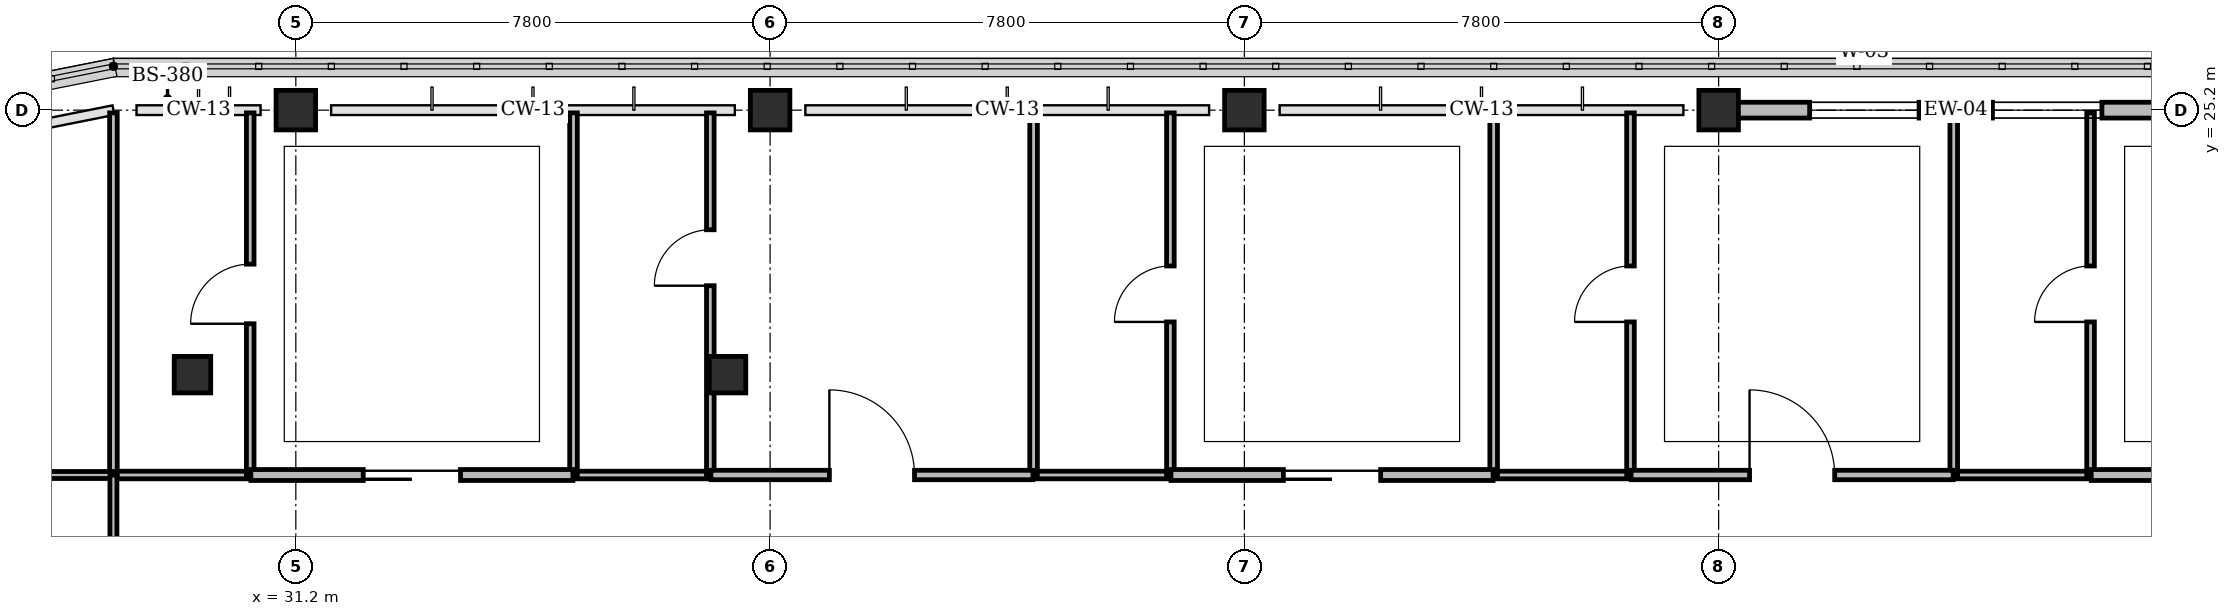
"""IFC4 building model, lengths in metres.
Left out: names, types, materials, properties, quantities, classifications, styles, units other than length and angle.
Written with IfcOpenShell. Run it as: python <this file> out.ifc"""

import sys

from ifc_helpers import new_model, si_unit, direction, frame, frame_2d, origin, origin_2d, place, context, subcontext, project, spatial, rectangle, circle, extrude, element, fill, save


model = new_model("IFC4")
c1 = context("Model", 3, precision=1e-05, world=origin(), true_north=direction((0.0, 1.0)))
c2 = subcontext(c1, "Body", "Model", "MODEL_VIEW")
j1 = project(units=[si_unit("LENGTHUNIT", "METRE"), si_unit("PLANEANGLEUNIT", "RADIAN")], contexts=[c1])
p1 = place(None, origin())
s1 = spatial("IfcSite", under=j1, at=p1, CompositionType="ELEMENT")
p2 = place(p1, origin())
s2 = spatial("IfcBuilding", under=s1, at=p2, CompositionType="ELEMENT")
p3 = place(p2, frame((0.0, 0.0, 18.0)))
s3 = spatial("IfcBuildingStorey", under=s2, at=p3, CompositionType="ELEMENT", Elevation=18.0)
for number, where, z_axis, x_axis in (
    (1, (31.2, 25.2, 0.0), (0.0, 0.0, 1.0), (1.0, 0.0, 0.0)),
    (2, (39.0, 25.2, 0.0), (0.0, 0.0, 1.0), (1.0, 0.0, 0.0)),
    (3, (46.8, 25.2, 0.0), (0.0, 0.0, 1.0), (1.0, 0.0, 0.0)),
    (4, (54.6, 25.2, 0.0), (0.0, 0.0, 1.0), (1.0, 0.0, 0.0)),
):
    element("IfcColumn", number, at=place(p3, frame(where, z_axis=z_axis, x_axis=x_axis)), inside=s3, PredefinedType="COLUMN", context=c2, shape_type="SweptSolid", body=[
        extrude(rectangle(XDim=0.65, YDim=0.65, at=origin_2d()), origin(), (0.0, 0.0, 1.0), 4.2),
    ])
for number, where, z_axis, x_axis in (
    (5, (29.5, 20.85, 0.0), (0.0, 0.0, 1.0), (1.0, 0.0, 0.0)),
    (6, (38.3, 20.85, 0.0), (0.0, 0.0, 1.0), (1.0, 0.0, 0.0)),
):
    element("IfcColumn", number, at=place(p3, frame(where, z_axis=z_axis, x_axis=x_axis)), inside=s3, PredefinedType="PILASTER", context=c2, shape_type="SweptSolid", body=[
        extrude(circle(Radius=0.3, at=origin_2d()), origin(), (0.0, 0.0, 1.0), 4.2),
    ])
p4 = place(p3, frame((54.89, 25.2, 0.0), z_axis=(0.0, 0.0, 1.0), x_axis=(1.0, 0.0, 0.0)))
e7 = element("IfcWall", 7, at=p4, inside=s3, PredefinedType="STANDARD", context=c2, shape_type="SweptSolid", body=[
    extrude(rectangle(XDim=7.22, YDim=0.26, at=frame_2d((3.61, 0.0))), origin(), (0.0, 0.0, 1.0), 3.255),
])
p5 = place(p4, frame((1.207, 0.0, 0.85)))
e8 = element("IfcOpeningElement", 8, at=p5, cuts=e7, PredefinedType="OPENING", context=c2, shape_type="SweptSolid", body=[
    extrude(rectangle(XDim=1.8, YDim=1.5, at=frame_2d((0.9, 0.75))), frame((0.0, 0.14, 0.0), z_axis=(0.0, -1.0, 0.0), x_axis=(1.0, 0.0, 0.0)), (0.0, 0.0, 1.0), 0.28),
])
p6 = place(p4, frame((4.213, 0.0, 0.85)))
e9 = element("IfcOpeningElement", 9, at=p6, cuts=e7, PredefinedType="OPENING", context=c2, shape_type="SweptSolid", body=[
    extrude(rectangle(XDim=1.8, YDim=1.5, at=frame_2d((0.9, 0.75))), frame((0.0, 0.14, 0.0), z_axis=(0.0, -1.0, 0.0), x_axis=(1.0, 0.0, 0.0)), (0.0, 0.0, 1.0), 0.28),
])
p7 = place(p3, frame((28.2, 19.2, 0.0), z_axis=(0.0, 0.0, 1.0), x_axis=(1.0, 0.0, 0.0)))
e10 = element("IfcWall", 10, at=p7, inside=s3, PredefinedType="PARTITIONING", context=c2, shape_type="SweptSolid", body=[
    extrude(rectangle(XDim=2.25, YDim=0.125, at=frame_2d((1.125, 0.0))), origin(), (0.0, 0.0, 1.0), 3.9),
])
p8 = place(p3, frame((28.2, 19.2, 0.0), z_axis=(0.0, 0.0, 1.0), x_axis=(0.0, 1.0, 0.0)))
e11 = element("IfcWall", 11, at=p8, inside=s3, PredefinedType="PARTITIONING", context=c2, shape_type="SweptSolid", body=[
    extrude(rectangle(XDim=5.955, YDim=0.125, at=frame_2d((2.978, 0.0))), origin(), (0.0, 0.0, 1.0), 3.9),
])
p9 = place(p3, frame((30.45, 19.2, 0.0), z_axis=(0.0, 0.0, 1.0), x_axis=(0.0, 1.0, 0.0)))
e12 = element("IfcWall", 12, at=p9, inside=s3, PredefinedType="PARTITIONING", context=c2, shape_type="SweptSolid", body=[
    extrude(rectangle(XDim=5.955, YDim=0.125, at=frame_2d((2.978, 0.0))), origin(), (0.0, 0.0, 1.0), 3.9),
])
p10 = place(p9, frame((2.488, 0.0, 0.0)))
e13 = element("IfcOpeningElement", 13, at=p10, cuts=e12, PredefinedType="OPENING", context=c2, shape_type="SweptSolid", body=[
    extrude(rectangle(XDim=0.98, YDim=2.1, at=frame_2d((0.49, 1.05))), frame((0.0, 0.073, 0.0), z_axis=(0.0, -1.0, 0.0), x_axis=(1.0, 0.0, 0.0)), (0.0, 0.0, 1.0), 0.145),
])
p11 = place(p3, frame((35.767, 19.2, 0.0), z_axis=(0.0, 0.0, 1.0), x_axis=(1.0, 0.0, 0.0)))
e14 = element("IfcWall", 14, at=p11, inside=s3, PredefinedType="PARTITIONING", context=c2, shape_type="SweptSolid", body=[
    extrude(rectangle(XDim=2.25, YDim=0.125, at=frame_2d((1.125, 0.0))), origin(), (0.0, 0.0, 1.0), 3.9),
])
p12 = place(p3, frame((35.767, 19.2, 0.0), z_axis=(0.0, 0.0, 1.0), x_axis=(0.0, 1.0, 0.0)))
e15 = element("IfcWall", 15, at=p12, inside=s3, PredefinedType="PARTITIONING", context=c2, shape_type="SweptSolid", body=[
    extrude(rectangle(XDim=5.955, YDim=0.125, at=frame_2d((2.978, 0.0))), origin(), (0.0, 0.0, 1.0), 3.9),
])
p13 = place(p3, frame((38.017, 19.2, 0.0), z_axis=(0.0, 0.0, 1.0), x_axis=(0.0, 1.0, 0.0)))
e16 = element("IfcWall", 16, at=p13, inside=s3, PredefinedType="PARTITIONING", context=c2, shape_type="SweptSolid", body=[
    extrude(rectangle(XDim=5.955, YDim=0.125, at=frame_2d((2.978, 0.0))), origin(), (0.0, 0.0, 1.0), 3.9),
])
p14 = place(p13, frame((3.113, 0.0, 0.0)))
e17 = element("IfcOpeningElement", 17, at=p14, cuts=e16, PredefinedType="OPENING", context=c2, shape_type="SweptSolid", body=[
    extrude(rectangle(XDim=0.92, YDim=2.1, at=frame_2d((0.46, 1.05))), frame((0.0, 0.073, 0.0), z_axis=(0.0, -1.0, 0.0), x_axis=(1.0, 0.0, 0.0)), (0.0, 0.0, 1.0), 0.145),
])
p15 = place(p3, frame((43.333, 19.2, 0.0), z_axis=(0.0, 0.0, 1.0), x_axis=(1.0, 0.0, 0.0)))
e18 = element("IfcWall", 18, at=p15, inside=s3, PredefinedType="PARTITIONING", context=c2, shape_type="SweptSolid", body=[
    extrude(rectangle(XDim=2.25, YDim=0.125, at=frame_2d((1.125, 0.0))), origin(), (0.0, 0.0, 1.0), 3.9),
])
p16 = place(p3, frame((43.333, 19.2, 0.0), z_axis=(0.0, 0.0, 1.0), x_axis=(0.0, 1.0, 0.0)))
e19 = element("IfcWall", 19, at=p16, inside=s3, PredefinedType="PARTITIONING", context=c2, shape_type="SweptSolid", body=[
    extrude(rectangle(XDim=5.955, YDim=0.125, at=frame_2d((2.978, 0.0))), origin(), (0.0, 0.0, 1.0), 3.9),
])
p17 = place(p3, frame((45.583, 19.2, 0.0), z_axis=(0.0, 0.0, 1.0), x_axis=(0.0, 1.0, 0.0)))
e20 = element("IfcWall", 20, at=p17, inside=s3, PredefinedType="PARTITIONING", context=c2, shape_type="SweptSolid", body=[
    extrude(rectangle(XDim=5.955, YDim=0.125, at=frame_2d((2.978, 0.0))), origin(), (0.0, 0.0, 1.0), 3.9),
])
p18 = place(p17, frame((2.518, 0.0, 0.0)))
e21 = element("IfcOpeningElement", 21, at=p18, cuts=e20, PredefinedType="OPENING", context=c2, shape_type="SweptSolid", body=[
    extrude(rectangle(XDim=0.92, YDim=2.1, at=frame_2d((0.46, 1.05))), frame((0.0, 0.073, 0.0), z_axis=(0.0, -1.0, 0.0), x_axis=(1.0, 0.0, 0.0)), (0.0, 0.0, 1.0), 0.145),
])
p19 = place(p3, frame((50.9, 19.2, 0.0), z_axis=(0.0, 0.0, 1.0), x_axis=(1.0, 0.0, 0.0)))
e22 = element("IfcWall", 22, at=p19, inside=s3, PredefinedType="PARTITIONING", context=c2, shape_type="SweptSolid", body=[
    extrude(rectangle(XDim=2.25, YDim=0.125, at=frame_2d((1.125, 0.0))), origin(), (0.0, 0.0, 1.0), 3.9),
])
p20 = place(p3, frame((50.9, 19.2, 0.0), z_axis=(0.0, 0.0, 1.0), x_axis=(0.0, 1.0, 0.0)))
e23 = element("IfcWall", 23, at=p20, inside=s3, PredefinedType="PARTITIONING", context=c2, shape_type="SweptSolid", body=[
    extrude(rectangle(XDim=5.955, YDim=0.125, at=frame_2d((2.978, 0.0))), origin(), (0.0, 0.0, 1.0), 3.9),
])
p21 = place(p3, frame((53.15, 19.2, 0.0), z_axis=(0.0, 0.0, 1.0), x_axis=(0.0, 1.0, 0.0)))
e24 = element("IfcWall", 24, at=p21, inside=s3, PredefinedType="PARTITIONING", context=c2, shape_type="SweptSolid", body=[
    extrude(rectangle(XDim=5.955, YDim=0.125, at=frame_2d((2.978, 0.0))), origin(), (0.0, 0.0, 1.0), 3.9),
])
p22 = place(p21, frame((2.518, 0.0, 0.0)))
e25 = element("IfcOpeningElement", 25, at=p22, cuts=e24, PredefinedType="OPENING", context=c2, shape_type="SweptSolid", body=[
    extrude(rectangle(XDim=0.92, YDim=2.1, at=frame_2d((0.46, 1.05))), frame((0.0, 0.073, 0.0), z_axis=(0.0, -1.0, 0.0), x_axis=(1.0, 0.0, 0.0)), (0.0, 0.0, 1.0), 0.145),
])
p23 = place(p3, frame((58.467, 19.2, 0.0), z_axis=(0.0, 0.0, 1.0), x_axis=(1.0, 0.0, 0.0)))
e26 = element("IfcWall", 26, at=p23, inside=s3, PredefinedType="PARTITIONING", context=c2, shape_type="SweptSolid", body=[
    extrude(rectangle(XDim=2.25, YDim=0.125, at=frame_2d((1.125, 0.0))), origin(), (0.0, 0.0, 1.0), 3.9),
])
p24 = place(p3, frame((58.467, 19.2, 0.0), z_axis=(0.0, 0.0, 1.0), x_axis=(0.0, 1.0, 0.0)))
e27 = element("IfcWall", 27, at=p24, inside=s3, PredefinedType="PARTITIONING", context=c2, shape_type="SweptSolid", body=[
    extrude(rectangle(XDim=5.955, YDim=0.125, at=frame_2d((2.978, 0.0))), origin(), (0.0, 0.0, 1.0), 3.9),
])
p25 = place(p3, frame((60.717, 19.2, 0.0), z_axis=(0.0, 0.0, 1.0), x_axis=(0.0, 1.0, 0.0)))
e28 = element("IfcWall", 28, at=p25, inside=s3, PredefinedType="PARTITIONING", context=c2, shape_type="SweptSolid", body=[
    extrude(rectangle(XDim=5.955, YDim=0.125, at=frame_2d((2.978, 0.0))), origin(), (0.0, 0.0, 1.0), 3.9),
])
p26 = place(p25, frame((2.518, 0.0, 0.0)))
e29 = element("IfcOpeningElement", 29, at=p26, cuts=e28, PredefinedType="OPENING", context=c2, shape_type="SweptSolid", body=[
    extrude(rectangle(XDim=0.92, YDim=2.1, at=frame_2d((0.46, 1.05))), frame((0.0, 0.073, 0.0), z_axis=(0.0, -1.0, 0.0), x_axis=(1.0, 0.0, 0.0)), (0.0, 0.0, 1.0), 0.145),
])
p27 = place(p3, frame((16.1, 19.2, 0.0), z_axis=(0.0, 0.0, 1.0), x_axis=(1.0, 0.0, 0.0)))
e30 = element("IfcWall", 30, at=p27, inside=s3, PredefinedType="PARTITIONING", context=c2, shape_type="SweptSolid", body=[
    extrude(rectangle(XDim=12.1, YDim=0.115, at=frame_2d((6.05, 0.0))), origin(), (0.0, 0.0, 1.0), 3.9),
])
p28 = place(p3, frame((28.2, 6.0, 0.0), z_axis=(0.0, 0.0, 1.0), x_axis=(0.0, 1.0, 0.0)))
e31 = element("IfcWall", 31, at=p28, inside=s3, PredefinedType="PARTITIONING", context=c2, shape_type="SweptSolid", body=[
    extrude(rectangle(XDim=13.2, YDim=0.115, at=frame_2d((6.6, 0.0))), origin(), (0.0, 0.0, 1.0), 3.9),
])
p29 = place(p28, frame((0.85, 0.0, 0.0)))
e32 = element("IfcOpeningElement", 32, at=p29, cuts=e31, PredefinedType="OPENING", context=c2, shape_type="SweptSolid", body=[
    extrude(rectangle(XDim=1.32, YDim=2.15, at=frame_2d((0.66, 1.075))), frame((0.0, 0.067, 0.0), z_axis=(0.0, -1.0, 0.0), x_axis=(1.0, 0.0, 0.0)), (0.0, 0.0, 1.0), 0.135),
])
p30 = place(p3, frame((30.46, 19.2, 0.0), z_axis=(0.0, 0.0, 1.0), x_axis=(1.0, 0.0, 0.0)))
e33 = element("IfcWall", 33, at=p30, inside=s3, PredefinedType="PARTITIONING", context=c2, shape_type="SweptSolid", body=[
    extrude(rectangle(XDim=5.297, YDim=0.18, at=frame_2d((2.648, 0.0))), origin(), (0.0, 0.0, 1.0), 3.9),
])
p31 = place(p30, frame((1.848, 0.0, 0.0)))
e34 = element("IfcOpeningElement", 34, at=p31, cuts=e33, PredefinedType="OPENING", context=c2, shape_type="SweptSolid", body=[
    extrude(rectangle(XDim=1.6, YDim=2.25, at=frame_2d((0.8, 1.125))), frame((0.0, 0.1, 0.0), z_axis=(0.0, -1.0, 0.0), x_axis=(1.0, 0.0, 0.0)), (0.0, 0.0, 1.0), 0.2),
])
p32 = place(p3, frame((38.027, 19.2, 0.0), z_axis=(0.0, 0.0, 1.0), x_axis=(1.0, 0.0, 0.0)))
e35 = element("IfcWall", 35, at=p32, inside=s3, PredefinedType="PARTITIONING", context=c2, shape_type="SweptSolid", body=[
    extrude(rectangle(XDim=5.296, YDim=0.155, at=frame_2d((2.648, 0.0))), origin(), (0.0, 0.0, 1.0), 3.9),
])
p33 = place(p32, frame((1.948, 0.0, 0.0)))
e36 = element("IfcOpeningElement", 36, at=p33, cuts=e35, PredefinedType="OPENING", context=c2, shape_type="SweptSolid", body=[
    extrude(rectangle(XDim=1.4, YDim=2.2, at=frame_2d((0.7, 1.1))), frame((0.0, 0.087, 0.0), z_axis=(0.0, -1.0, 0.0), x_axis=(1.0, 0.0, 0.0)), (0.0, 0.0, 1.0), 0.175),
])
p34 = place(p3, frame((45.593, 19.2, 0.0), z_axis=(0.0, 0.0, 1.0), x_axis=(1.0, 0.0, 0.0)))
e37 = element("IfcWall", 37, at=p34, inside=s3, PredefinedType="PARTITIONING", context=c2, shape_type="SweptSolid", body=[
    extrude(rectangle(XDim=5.297, YDim=0.18, at=frame_2d((2.648, 0.0))), origin(), (0.0, 0.0, 1.0), 3.9),
])
p35 = place(p34, frame((1.848, 0.0, 0.0)))
e38 = element("IfcOpeningElement", 38, at=p35, cuts=e37, PredefinedType="OPENING", context=c2, shape_type="SweptSolid", body=[
    extrude(rectangle(XDim=1.6, YDim=2.25, at=frame_2d((0.8, 1.125))), frame((0.0, 0.1, 0.0), z_axis=(0.0, -1.0, 0.0), x_axis=(1.0, 0.0, 0.0)), (0.0, 0.0, 1.0), 0.2),
])
p36 = place(p3, frame((53.16, 19.2, 0.0), z_axis=(0.0, 0.0, 1.0), x_axis=(1.0, 0.0, 0.0)))
e39 = element("IfcWall", 39, at=p36, inside=s3, PredefinedType="PARTITIONING", context=c2, shape_type="SweptSolid", body=[
    extrude(rectangle(XDim=5.297, YDim=0.155, at=frame_2d((2.648, 0.0))), origin(), (0.0, 0.0, 1.0), 3.9),
])
p37 = place(p36, frame((1.948, 0.0, 0.0)))
e40 = element("IfcOpeningElement", 40, at=p37, cuts=e39, PredefinedType="OPENING", context=c2, shape_type="SweptSolid", body=[
    extrude(rectangle(XDim=1.4, YDim=2.2, at=frame_2d((0.7, 1.1))), frame((0.0, 0.087, 0.0), z_axis=(0.0, -1.0, 0.0), x_axis=(1.0, 0.0, 0.0)), (0.0, 0.0, 1.0), 0.175),
])
p38 = place(p3, frame((60.727, 19.2, 0.0), z_axis=(0.0, 0.0, 1.0), x_axis=(1.0, 0.0, 0.0)))
e41 = element("IfcWall", 41, at=p38, inside=s3, PredefinedType="PARTITIONING", context=c2, shape_type="SweptSolid", body=[
    extrude(rectangle(XDim=5.296, YDim=0.18, at=frame_2d((2.648, 0.0))), origin(), (0.0, 0.0, 1.0), 3.9),
])
p39 = place(p38, frame((1.848, 0.0, 0.0)))
e42 = element("IfcOpeningElement", 42, at=p39, cuts=e41, PredefinedType="OPENING", context=c2, shape_type="SweptSolid", body=[
    extrude(rectangle(XDim=1.6, YDim=2.25, at=frame_2d((0.8, 1.125))), frame((0.0, 0.1, 0.0), z_axis=(0.0, -1.0, 0.0), x_axis=(1.0, 0.0, 0.0)), (0.0, 0.0, 1.0), 0.2),
])
p40 = place(p5, origin())
e43 = element("IfcWindow", 43, at=p40, inside=s3, PartitioningType="SINGLE_PANEL", PredefinedType="WINDOW", context=c2, shape_type="SweptSolid", body=[
    extrude(rectangle(XDim=1.8, YDim=1.5, at=frame_2d((0.9, 0.75))), frame((0.0, 0.03, 0.0), z_axis=(0.0, -1.0, 0.0), x_axis=(1.0, 0.0, 0.0)), (0.0, 0.0, 1.0), 0.06),
])
fill(e8, e43)
p41 = place(p6, origin())
e44 = element("IfcWindow", 44, at=p41, inside=s3, PartitioningType="SINGLE_PANEL", PredefinedType="WINDOW", context=c2, shape_type="SweptSolid", body=[
    extrude(rectangle(XDim=1.8, YDim=1.5, at=frame_2d((0.9, 0.75))), frame((0.0, 0.03, 0.0), z_axis=(0.0, -1.0, 0.0), x_axis=(1.0, 0.0, 0.0)), (0.0, 0.0, 1.0), 0.06),
])
fill(e9, e44)
p42 = place(p10, origin())
e45 = element("IfcDoor", 45, at=p42, inside=s3, OperationType="SINGLE_SWING_LEFT", PredefinedType="DOOR", context=c2, shape_type="SweptSolid", body=[
    extrude(rectangle(XDim=0.98, YDim=2.1, at=frame_2d((0.49, 1.05))), frame((0.0, 0.025, 0.0), z_axis=(0.0, -1.0, 0.0), x_axis=(1.0, 0.0, 0.0)), (0.0, 0.0, 1.0), 0.05),
])
fill(e13, e45)
p43 = place(p14, origin())
e46 = element("IfcDoor", 46, at=p43, inside=s3, OperationType="SINGLE_SWING_LEFT", PredefinedType="DOOR", context=c2, shape_type="SweptSolid", body=[
    extrude(rectangle(XDim=0.92, YDim=2.1, at=frame_2d((0.46, 1.05))), frame((0.0, 0.025, 0.0), z_axis=(0.0, -1.0, 0.0), x_axis=(1.0, 0.0, 0.0)), (0.0, 0.0, 1.0), 0.05),
])
fill(e17, e46)
p44 = place(p18, origin())
e47 = element("IfcDoor", 47, at=p44, inside=s3, OperationType="SINGLE_SWING_LEFT", PredefinedType="DOOR", context=c2, shape_type="SweptSolid", body=[
    extrude(rectangle(XDim=0.92, YDim=2.1, at=frame_2d((0.46, 1.05))), frame((0.0, 0.025, 0.0), z_axis=(0.0, -1.0, 0.0), x_axis=(1.0, 0.0, 0.0)), (0.0, 0.0, 1.0), 0.05),
])
fill(e21, e47)
p45 = place(p22, origin())
e48 = element("IfcDoor", 48, at=p45, inside=s3, OperationType="SINGLE_SWING_LEFT", PredefinedType="DOOR", context=c2, shape_type="SweptSolid", body=[
    extrude(rectangle(XDim=0.92, YDim=2.1, at=frame_2d((0.46, 1.05))), frame((0.0, 0.025, 0.0), z_axis=(0.0, -1.0, 0.0), x_axis=(1.0, 0.0, 0.0)), (0.0, 0.0, 1.0), 0.05),
])
fill(e25, e48)
p46 = place(p26, origin())
e49 = element("IfcDoor", 49, at=p46, inside=s3, OperationType="SINGLE_SWING_LEFT", PredefinedType="DOOR", context=c2, shape_type="SweptSolid", body=[
    extrude(rectangle(XDim=0.92, YDim=2.1, at=frame_2d((0.46, 1.05))), frame((0.0, 0.025, 0.0), z_axis=(0.0, -1.0, 0.0), x_axis=(1.0, 0.0, 0.0)), (0.0, 0.0, 1.0), 0.05),
])
fill(e29, e49)
p47 = place(p31, origin())
e50 = element("IfcDoor", 50, at=p47, inside=s3, OperationType="SLIDING_TO_RIGHT", PredefinedType="DOOR", context=c2, shape_type="SweptSolid", body=[
    extrude(rectangle(XDim=1.6, YDim=2.25, at=frame_2d((0.8, 1.125))), frame((0.0, 0.025, 0.0), z_axis=(0.0, -1.0, 0.0), x_axis=(1.0, 0.0, 0.0)), (0.0, 0.0, 1.0), 0.05),
])
fill(e34, e50)
p48 = place(p33, origin())
e51 = element("IfcDoor", 51, at=p48, inside=s3, OperationType="SINGLE_SWING_LEFT", PredefinedType="DOOR", context=c2, shape_type="SweptSolid", body=[
    extrude(rectangle(XDim=1.4, YDim=2.2, at=frame_2d((0.7, 1.1))), frame((0.0, 0.025, 0.0), z_axis=(0.0, -1.0, 0.0), x_axis=(1.0, 0.0, 0.0)), (0.0, 0.0, 1.0), 0.05),
])
fill(e36, e51)
p49 = place(p35, origin())
e52 = element("IfcDoor", 52, at=p49, inside=s3, OperationType="SLIDING_TO_RIGHT", PredefinedType="DOOR", context=c2, shape_type="SweptSolid", body=[
    extrude(rectangle(XDim=1.6, YDim=2.25, at=frame_2d((0.8, 1.125))), frame((0.0, 0.025, 0.0), z_axis=(0.0, -1.0, 0.0), x_axis=(1.0, 0.0, 0.0)), (0.0, 0.0, 1.0), 0.05),
])
fill(e38, e52)
p50 = place(p37, origin())
e53 = element("IfcDoor", 53, at=p50, inside=s3, OperationType="SINGLE_SWING_LEFT", PredefinedType="DOOR", context=c2, shape_type="SweptSolid", body=[
    extrude(rectangle(XDim=1.4, YDim=2.2, at=frame_2d((0.7, 1.1))), frame((0.0, 0.025, 0.0), z_axis=(0.0, -1.0, 0.0), x_axis=(1.0, 0.0, 0.0)), (0.0, 0.0, 1.0), 0.05),
])
fill(e40, e53)
save(model, sys.argv[1])
